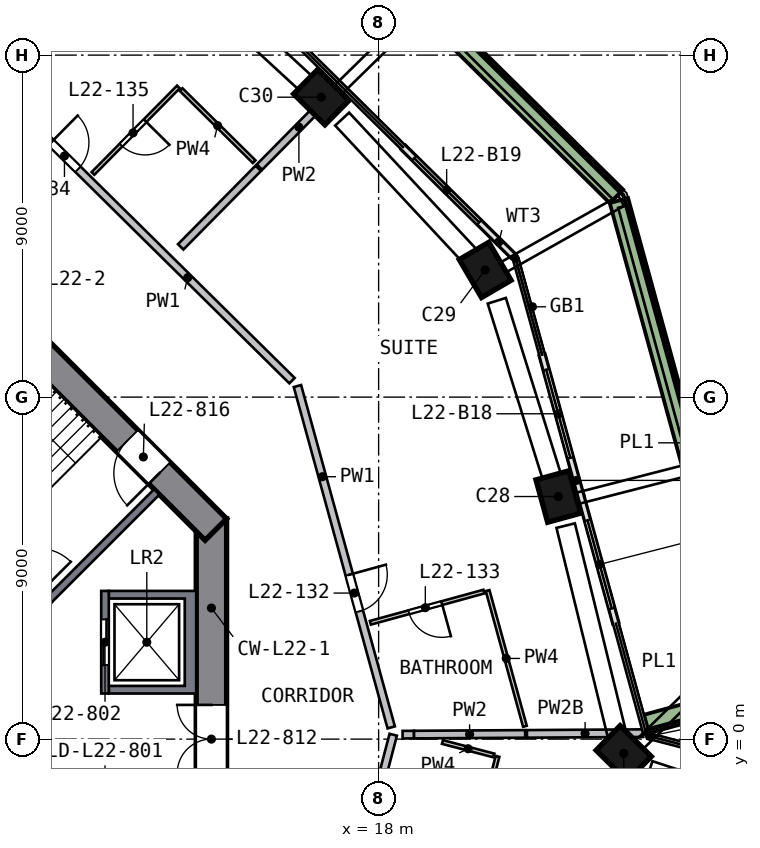
"""IFC4 building model, lengths in metres.
Left out: names, types, materials, properties, quantities, classifications, styles, units other than length and angle.
Written with IfcOpenShell. Run it as: python <this file> out.ifc"""

import sys

from ifc_helpers import new_model, si_unit, direction, frame, frame_2d, origin, origin_2d, place, context, subcontext, project, spatial, polyline, rectangle, outline, extrude, element, fill, save


model = new_model("IFC4")
c1 = context("Model", 3, precision=1e-05, world=origin(), true_north=direction((0.0, 1.0)))
c2 = subcontext(c1, "Body", "Model", "MODEL_VIEW")
j1 = project(units=[si_unit("LENGTHUNIT", "METRE"), si_unit("PLANEANGLEUNIT", "RADIAN")], contexts=[c1])
p1 = place(None, origin())
s1 = spatial("IfcSite", under=j1, at=p1, CompositionType="ELEMENT")
p2 = place(p1, origin())
s2 = spatial("IfcBuilding", under=s1, at=p2, CompositionType="ELEMENT")
p3 = place(p2, frame((0.0, 0.0, 96.5)))
s3 = spatial("IfcBuildingStorey", under=s2, at=p3, CompositionType="ELEMENT", Elevation=96.5)
p4 = place(p3, frame((24.448, -0.516, 0.0), z_axis=(0.001444299, 0.116228048, 0.993221503), x_axis=(0.71418589, -0.69533129, 0.080330018)))
e1 = element("IfcColumn", 1, at=p4, inside=s3, PredefinedType="COLUMN", context=c2, shape_type="SweptSolid", body=[
    extrude(rectangle(XDim=1.15, YDim=0.9, at=origin_2d()), origin(), (0.0, 0.0, 1.0), 3.212),
])
p5 = place(p3, frame((22.765, 6.253, 0.0), z_axis=(-0.030724182, 0.108066988, 0.993668733), x_axis=(-0.263618015, 0.958062623, -0.112345681)))
e2 = element("IfcColumn", 2, at=p5, inside=s3, PredefinedType="COLUMN", context=c2, shape_type="SweptSolid", body=[
    extrude(rectangle(XDim=1.15, YDim=0.9, at=origin_2d()), origin(), (0.0, 0.0, 1.0), 3.21),
])
p6 = place(p3, frame((20.875, 12.228, 0.0), z_axis=(-0.058920732, 0.098758749, 0.99336552), x_axis=(0.501695659, -0.857366586, 0.114995663)))
e3 = element("IfcColumn", 3, at=p6, inside=s3, PredefinedType="COLUMN", context=c2, shape_type="SweptSolid", body=[
    extrude(rectangle(XDim=1.15, YDim=0.9, at=origin_2d()), origin(), (0.0, 0.0, 1.0), 3.211),
])
p7 = place(p3, frame((16.588, 16.798, 0.0), z_axis=(-0.080537401, 0.078255888, 0.993674868), x_axis=(-0.706754906, 0.698489901, -0.112291409)))
e4 = element("IfcColumn", 4, at=p7, inside=s3, PredefinedType="COLUMN", context=c2, shape_type="SweptSolid", body=[
    extrude(rectangle(XDim=1.15, YDim=0.9, at=origin_2d()), origin(), (0.0, 0.0, 1.0), 3.21),
])
p8 = place(p3, frame((13.6, -5.799, 0.0), z_axis=(0.0, 0.0, 1.0), x_axis=(0.0, 1.0, 0.0)))
e5 = element("IfcWall", 5, at=p8, inside=s3, PredefinedType="SHEAR", context=c2, shape_type="SweptSolid", body=[
    extrude(rectangle(XDim=11.598, YDim=0.8, at=frame_2d((5.799, 0.0))), origin(), (0.0, 0.0, 1.0), 3.5),
])
p9 = place(p8, frame((4.899, 0.0, 0.0)))
e6 = element("IfcOpeningElement", 6, at=p9, cuts=e5, PredefinedType="OPENING", context=c2, shape_type="SweptSolid", body=[
    extrude(rectangle(XDim=1.8, YDim=2.1, at=frame_2d((0.9, 1.05))), frame((0.0, 0.41, 0.0), z_axis=(0.0, -1.0, 0.0), x_axis=(1.0, 0.0, 0.0)), (0.0, 0.0, 1.0), 0.82),
])
p10 = place(p3, frame((13.717, 5.516, 0.0), z_axis=(0.0, 0.0, 1.0), x_axis=(-0.707106781, 0.707106781, 0.0)))
e7 = element("IfcWall", 7, at=p10, inside=s3, PredefinedType="SHEAR", context=c2, shape_type="SweptSolid", body=[
    extrude(rectangle(XDim=11.598, YDim=0.8, at=frame_2d((5.799, 0.0))), origin(), (0.0, 0.0, 1.0), 3.5),
])
p11 = place(p10, frame((2.099, 0.0, 0.0)))
e8 = element("IfcOpeningElement", 8, at=p11, cuts=e7, PredefinedType="OPENING", context=c2, shape_type="SweptSolid", body=[
    extrude(rectangle(XDim=1.2, YDim=2.1, at=frame_2d((0.6, 1.05))), frame((0.0, 0.41, 0.0), z_axis=(0.0, -1.0, 0.0), x_axis=(1.0, 0.0, 0.0)), (0.0, 0.0, 1.0), 0.82),
])
p12 = place(p3, frame((24.24, 3.055, 0.0), z_axis=(0.0, 0.0, 1.0), x_axis=(-0.264870706, 0.964283936, 0.0)))
e9 = element("IfcWall", 9, at=p12, inside=s3, PredefinedType="SOLIDWALL", context=c2, shape_type="SweptSolid", body=[
    extrude(rectangle(XDim=3.475, YDim=0.15, at=frame_2d((1.737, 0.0))), origin(), (0.0, 0.0, 1.0), 2.425),
])
p13 = place(p12, frame((0.4, 0.0, 0.0)))
e10 = element("IfcOpeningElement", 10, at=p13, cuts=e9, PredefinedType="OPENING", context=c2, shape_type="SweptSolid", body=[
    extrude(rectangle(XDim=2.4, YDim=2.4, at=frame_2d((1.2, 1.2))), frame((0.0, 0.085, 0.0), z_axis=(0.0, -1.0, 0.0), x_axis=(1.0, 0.0, 0.0)), (0.0, 0.0, 1.0), 0.17),
])
p14 = place(p3, frame((23.32, 6.406, 0.0), z_axis=(0.0, 0.0, 1.0), x_axis=(-0.264921246, 0.964270052, 0.0)))
e11 = element("IfcWall", 11, at=p14, inside=s3, PredefinedType="SOLIDWALL", context=c2, shape_type="SweptSolid", body=[
    extrude(rectangle(XDim=3.835, YDim=0.15, at=frame_2d((1.918, 0.0))), origin(), (0.0, 0.0, 1.0), 2.425),
])
p15 = place(p14, frame((1.035, 0.0, 0.0)))
e12 = element("IfcOpeningElement", 12, at=p15, cuts=e11, PredefinedType="OPENING", context=c2, shape_type="SweptSolid", body=[
    extrude(rectangle(XDim=2.4, YDim=2.4, at=frame_2d((1.2, 1.2))), frame((0.0, 0.085, 0.0), z_axis=(0.0, -1.0, 0.0), x_axis=(1.0, 0.0, 0.0)), (0.0, 0.0, 1.0), 0.17),
])
p16 = place(p3, frame((21.546, 12.71, 0.0), z_axis=(0.0, 0.0, 1.0), x_axis=(-0.711563926, 0.702621363, 0.0)))
e13 = element("IfcWall", 13, at=p16, inside=s3, PredefinedType="SOLIDWALL", context=c2, shape_type="SweptSolid", body=[
    extrude(rectangle(XDim=4.068, YDim=0.15, at=frame_2d((2.034, 0.0))), origin(), (0.0, 0.0, 1.0), 2.425),
])
p17 = place(p16, frame((1.268, 0.0, 0.0)))
e14 = element("IfcOpeningElement", 14, at=p17, cuts=e13, PredefinedType="OPENING", context=c2, shape_type="SweptSolid", body=[
    extrude(rectangle(XDim=2.4, YDim=2.4, at=frame_2d((1.2, 1.2))), frame((0.0, 0.085, 0.0), z_axis=(0.0, -1.0, 0.0), x_axis=(1.0, 0.0, 0.0)), (0.0, 0.0, 1.0), 0.17),
])
p18 = place(p3, frame((25.048, 0.399, 0.0), z_axis=(0.0, 0.0, 1.0), x_axis=(0.964276089, 0.264899272, 0.0)))
e15 = element("IfcWall", 15, at=p18, inside=s3, PredefinedType="SOLIDWALL", context=c2, shape_type="SweptSolid", body=[
    extrude(rectangle(XDim=3.199, YDim=0.5, at=frame_2d((1.6, 0.0))), origin(), (0.0, 0.0, 1.0), 0.7),
])
p19 = place(p3, frame((27.826, 1.421, 0.0), z_axis=(0.0, 0.0, 1.0), x_axis=(-0.264886985, 0.964279464, 0.0)))
e16 = element("IfcWall", 16, at=p19, inside=s3, PredefinedType="SOLIDWALL", context=c2, shape_type="SweptSolid", body=[
    extrude(rectangle(XDim=13.223, YDim=0.5, at=frame_2d((6.612, 0.0))), origin(), (0.0, 0.0, 1.0), 0.7),
])
p20 = place(p3, frame((24.258, 14.284, 0.0), z_axis=(0.0, 0.0, 1.0), x_axis=(-0.711531471, 0.702654229, 0.0)))
e17 = element("IfcWall", 17, at=p20, inside=s3, PredefinedType="SOLIDWALL", context=c2, shape_type="SweptSolid", body=[
    extrude(rectangle(XDim=13.723, YDim=0.5, at=frame_2d((6.862, 0.0))), origin(), (0.0, 0.0, 1.0), 0.7),
])
p21 = place(p3, frame((27.95, -0.738, 0.0), z_axis=(0.0, 0.0, 1.0), x_axis=(-0.252753687, -0.967530658, 0.0)))
e18 = element("IfcWall", 18, at=p21, inside=s3, PredefinedType="SOLIDWALL", context=c2, shape_type="SweptSolid", body=[
    extrude(rectangle(XDim=12.7, YDim=0.2, at=frame_2d((6.35, 0.0))), origin(), (0.0, 0.0, 1.0), 3.19),
])
p22 = place(p21, frame((5.45, 0.0, 0.0)))
e19 = element("IfcOpeningElement", 19, at=p22, cuts=e18, PredefinedType="OPENING", context=c2, shape_type="SweptSolid", body=[
    extrude(rectangle(XDim=1.8, YDim=2.4, at=frame_2d((0.9, 1.2))), frame((0.0, 0.11, 0.0), z_axis=(0.0, -1.0, 0.0), x_axis=(1.0, 0.0, 0.0)), (0.0, 0.0, 1.0), 0.22),
])
p23 = place(p3, origin())
e20 = element("IfcWall", 20, at=p23, inside=s3, PredefinedType="SOLIDWALL", context=c2, shape_type="SweptSolid", body=[
    extrude(outline(polyline([(13.2, 3.9), (13.2, 1.2), (10.9, 1.2), (10.9, 1.4), (12.9, 1.4), (12.9, 3.7), (10.9, 3.7), (10.9, 3.9), (13.2, 3.9)])), origin(), (0.0, 0.0, 1.0), 3.19),
])
p24 = place(p3, frame((10.8, 1.2, 0.0), z_axis=(0.0, 0.0, 1.0), x_axis=(0.0, 1.0, 0.0)))
e21 = element("IfcWall", 21, at=p24, inside=s3, PredefinedType="SOLIDWALL", context=c2, shape_type="SweptSolid", body=[
    extrude(rectangle(XDim=2.7, YDim=0.2, at=frame_2d((1.35, 0.0))), origin(), (0.0, 0.0, 1.0), 3.19),
])
p25 = place(p24, frame((0.75, 0.0, 0.0)))
e22 = element("IfcOpeningElement", 22, at=p25, cuts=e21, PredefinedType="OPENING", context=c2, shape_type="SweptSolid", body=[
    extrude(rectangle(XDim=1.2, YDim=2.1, at=frame_2d((0.6, 1.05))), frame((0.0, 0.11, 0.0), z_axis=(0.0, -1.0, 0.0), x_axis=(1.0, 0.0, 0.0)), (0.0, 0.0, 1.0), 0.22),
])
p26 = place(p3, frame((9.334, 3.677, 0.0), z_axis=(0.0, 0.0, 1.0), x_axis=(0.707106781, 0.707106781, 0.0)))
e23 = element("IfcWall", 23, at=p26, inside=s3, PredefinedType="SOLIDWALL", context=c2, shape_type="SweptSolid", body=[
    extrude(rectangle(XDim=4.0, YDim=0.2, at=frame_2d((2.0, 0.0))), origin(), (0.0, 0.0, 1.0), 3.19),
])
p27 = place(p3, frame((9.235, 15.838, 0.0), z_axis=(0.0, 0.0, 1.0), x_axis=(0.71153875, -0.702646859, 0.0)))
e24 = element("IfcWall", 24, at=p27, inside=s3, PredefinedType="SOLIDWALL", context=c2, shape_type="SweptSolid", body=[
    extrude(rectangle(XDim=9.115, YDim=0.2, at=frame_2d((4.558, 0.0))), origin(), (0.0, 0.0, 1.0), 3.19),
])
p28 = place(p27, frame((0.2, 0.0, 0.0)))
e25 = element("IfcOpeningElement", 25, at=p28, cuts=e24, PredefinedType="OPENING", context=c2, shape_type="SweptSolid", body=[
    extrude(rectangle(XDim=1.0, YDim=2.1, at=frame_2d((0.5, 1.05))), frame((0.0, 0.11, 0.0), z_axis=(0.0, -1.0, 0.0), x_axis=(1.0, 0.0, 0.0)), (0.0, 0.0, 1.0), 0.22),
])
p29 = place(p3, frame((15.864, 9.292, 0.0), z_axis=(0.0, 0.0, 1.0), x_axis=(0.264866543, -0.96428508, 0.0)))
e26 = element("IfcWall", 26, at=p29, inside=s3, PredefinedType="SOLIDWALL", context=c2, shape_type="SweptSolid", body=[
    extrude(rectangle(XDim=9.316, YDim=0.2, at=frame_2d((4.658, 0.0))), origin(), (0.0, 0.0, 1.0), 3.19),
])
p30 = place(p29, frame((5.15, 0.0, 0.0)))
e27 = element("IfcOpeningElement", 27, at=p30, cuts=e26, PredefinedType="OPENING", context=c2, shape_type="SweptSolid", body=[
    extrude(rectangle(XDim=1.0, YDim=2.1, at=frame_2d((0.5, 1.05))), frame((0.0, 0.11, 0.0), z_axis=(0.0, -1.0, 0.0), x_axis=(1.0, 0.0, 0.0)), (0.0, 0.0, 1.0), 0.22),
])
p31 = place(p3, frame((17.46, -3.424, 0.0), z_axis=(0.0, 0.0, 1.0), x_axis=(0.252791341, 0.96752082, 0.0)))
e28 = element("IfcWall", 28, at=p31, inside=s3, PredefinedType="SOLIDWALL", context=c2, shape_type="SweptSolid", body=[
    extrude(rectangle(XDim=3.658, YDim=0.2, at=frame_2d((1.829, 0.0))), origin(), (0.0, 0.0, 1.0), 3.19),
])
p32 = place(p3, frame((12.792, 12.954, 0.0), z_axis=(0.0, 0.0, 1.0), x_axis=(0.702638225, 0.711547275, 0.0)))
e29 = element("IfcWall", 29, at=p32, inside=s3, PredefinedType="SOLIDWALL", context=c2, shape_type="SweptSolid", body=[
    extrude(rectangle(XDim=2.905, YDim=0.2, at=frame_2d((1.452, 0.0))), origin(), (0.0, 0.0, 1.0), 3.19),
])
p33 = place(p3, frame((14.865, 15.053, 0.0), z_axis=(0.0, 0.0, 1.0), x_axis=(0.702668179, 0.711517695, 0.0)))
e30 = element("IfcWall", 30, at=p33, inside=s3, PredefinedType="SOLIDWALL", context=c2, shape_type="SweptSolid", body=[
    extrude(rectangle(XDim=2.952, YDim=0.2, at=frame_2d((1.476, 0.0))), origin(), (0.0, 0.0, 1.0), 3.19),
])
p34 = place(p3, frame((18.631, 0.117, 0.0), z_axis=(0.0, 0.0, 1.0), x_axis=(0.999983911, 0.005672518, 0.0)))
e31 = element("IfcWall", 31, at=p34, inside=s3, PredefinedType="SOLIDWALL", context=c2, shape_type="SweptSolid", body=[
    extrude(rectangle(XDim=0.301, YDim=0.2, at=frame_2d((0.151, 0.0))), origin(), (0.0, 0.0, 1.0), 3.19),
])
p35 = place(p3, frame((18.932, 0.119, 0.0), z_axis=(0.0, 0.0, 1.0), x_axis=(0.999980398, 0.006261357, 0.0)))
e32 = element("IfcWall", 32, at=p35, inside=s3, PredefinedType="SOLIDWALL", context=c2, shape_type="SweptSolid", body=[
    extrude(rectangle(XDim=2.924, YDim=0.2, at=frame_2d((1.462, 0.0))), origin(), (0.0, 0.0, 1.0), 3.19),
])
p36 = place(p3, frame((21.902, 0.138, 0.0), z_axis=(0.0, 0.0, 1.0), x_axis=(0.999980157, 0.006299715, 0.0)))
e33 = element("IfcWall", 33, at=p36, inside=s3, PredefinedType="SOLIDWALL", context=c2, shape_type="SweptSolid", body=[
    extrude(rectangle(XDim=3.062, YDim=0.2, at=frame_2d((1.531, 0.0))), origin(), (0.0, 0.0, 1.0), 2.69),
])
p37 = place(p3, frame((12.732, 17.163, 0.0), z_axis=(0.0, 0.0, 1.0), x_axis=(-0.702667882, -0.711517988, 0.0)))
e34 = element("IfcWall", 34, at=p37, inside=s3, PredefinedType="PARTITIONING", context=c2, shape_type="SweptSolid", body=[
    extrude(rectangle(XDim=3.2, YDim=0.1, at=frame_2d((1.6, 0.0))), origin(), (0.0, 0.0, 1.0), 3.19),
])
p38 = place(p37, frame((1.25, 0.0, 0.0)))
e35 = element("IfcOpeningElement", 35, at=p38, cuts=e34, PredefinedType="OPENING", context=c2, shape_type="SweptSolid", body=[
    extrude(rectangle(XDim=0.9, YDim=2.1, at=frame_2d((0.45, 1.05))), frame((0.0, 0.06, 0.0), z_axis=(0.0, -1.0, 0.0), x_axis=(1.0, 0.0, 0.0)), (0.0, 0.0, 1.0), 0.12),
])
p39 = place(p3, frame((12.803, 17.093, 0.0), z_axis=(0.0, 0.0, 1.0), x_axis=(0.711523533, -0.702662267, 0.0)))
e36 = element("IfcWall", 36, at=p39, inside=s3, PredefinedType="PARTITIONING", context=c2, shape_type="SweptSolid", body=[
    extrude(rectangle(XDim=2.7, YDim=0.1, at=frame_2d((1.35, 0.0))), origin(), (0.0, 0.0, 1.0), 3.19),
])
p40 = place(p3, frame((20.772, 3.883, 0.0), z_axis=(0.0, 0.0, 1.0), x_axis=(-0.964267784, -0.264929502, 0.0)))
e37 = element("IfcWall", 37, at=p40, inside=s3, PredefinedType="PARTITIONING", context=c2, shape_type="SweptSolid", body=[
    extrude(rectangle(XDim=3.1, YDim=0.1, at=frame_2d((1.55, 0.0))), origin(), (0.0, 0.0, 1.0), 3.19),
])
p41 = place(p40, frame((1.15, 0.0, 0.0)))
e38 = element("IfcOpeningElement", 38, at=p41, cuts=e37, PredefinedType="OPENING", context=c2, shape_type="SweptSolid", body=[
    extrude(rectangle(XDim=0.9, YDim=2.1, at=frame_2d((0.45, 1.05))), frame((0.0, 0.06, 0.0), z_axis=(0.0, -1.0, 0.0), x_axis=(1.0, 0.0, 0.0)), (0.0, 0.0, 1.0), 0.12),
])
p42 = place(p3, frame((19.679, -0.076, 0.0), z_axis=(0.0, 0.0, 1.0), x_axis=(0.967574623, -0.252585329, 0.0)))
e39 = element("IfcWall", 39, at=p42, inside=s3, PredefinedType="PARTITIONING", context=c2, shape_type="SweptSolid", body=[
    extrude(rectangle(XDim=1.399, YDim=0.1, at=frame_2d((0.699, 0.0))), origin(), (0.0, 0.0, 1.0), 3.19),
])
p43 = place(p3, frame((20.219, -3.938, 0.0), z_axis=(0.0, 0.0, 1.0), x_axis=(0.2527504, 0.967531516, 0.0)))
e40 = element("IfcWall", 40, at=p43, inside=s3, PredefinedType="PARTITIONING", context=c2, shape_type="SweptSolid", body=[
    extrude(rectangle(XDim=3.6, YDim=0.1, at=frame_2d((1.8, 0.0))), origin(), (0.0, 0.0, 1.0), 3.19),
])
p44 = place(p43, frame((1.2, 0.0, 0.0)))
e41 = element("IfcOpeningElement", 41, at=p44, cuts=e40, PredefinedType="OPENING", context=c2, shape_type="SweptSolid", body=[
    extrude(rectangle(XDim=1.0, YDim=2.1, at=frame_2d((0.5, 1.05))), frame((0.0, 0.06, 0.0), z_axis=(0.0, -1.0, 0.0), x_axis=(1.0, 0.0, 0.0)), (0.0, 0.0, 1.0), 0.12),
])
p45 = place(p3, frame((20.868, 3.909, 0.0), z_axis=(0.0, 0.0, 1.0), x_axis=(0.264851593, -0.964289186, 0.0)))
e42 = element("IfcWall", 42, at=p45, inside=s3, PredefinedType="PARTITIONING", context=c2, shape_type="SweptSolid", body=[
    extrude(rectangle(XDim=3.704, YDim=0.1, at=frame_2d((1.852, 0.0))), origin(), (0.0, 0.0, 1.0), 3.19),
])
p46 = place(p13, origin())
e43 = element("IfcDoor", 43, at=p46, inside=s3, OperationType="SLIDING_TO_RIGHT", PredefinedType="DOOR", context=c2, shape_type="SweptSolid", body=[
    extrude(rectangle(XDim=2.4, YDim=2.4, at=frame_2d((1.2, 1.2))), frame((0.0, 0.025, 0.0), z_axis=(0.0, -1.0, 0.0), x_axis=(1.0, 0.0, 0.0)), (0.0, 0.0, 1.0), 0.05),
])
fill(e10, e43)
p47 = place(p15, origin())
e44 = element("IfcDoor", 44, at=p47, inside=s3, OperationType="SLIDING_TO_LEFT", PredefinedType="DOOR", context=c2, shape_type="SweptSolid", body=[
    extrude(rectangle(XDim=2.4, YDim=2.4, at=frame_2d((1.2, 1.2))), frame((0.0, 0.025, 0.0), z_axis=(0.0, -1.0, 0.0), x_axis=(1.0, 0.0, 0.0)), (0.0, 0.0, 1.0), 0.05),
])
fill(e12, e44)
p48 = place(p17, origin())
e45 = element("IfcDoor", 45, at=p48, inside=s3, OperationType="SLIDING_TO_LEFT", PredefinedType="DOOR", context=c2, shape_type="SweptSolid", body=[
    extrude(rectangle(XDim=2.4, YDim=2.4, at=frame_2d((1.2, 1.2))), frame((0.0, 0.025, 0.0), z_axis=(0.0, -1.0, 0.0), x_axis=(1.0, 0.0, 0.0)), (0.0, 0.0, 1.0), 0.05),
])
fill(e14, e45)
p49 = place(p25, origin())
e46 = element("IfcDoor", 46, at=p49, inside=s3, OperationType="DOUBLE_DOOR_SLIDING", PredefinedType="DOOR", context=c2, shape_type="SweptSolid", body=[
    extrude(rectangle(XDim=1.2, YDim=2.1, at=frame_2d((0.6, 1.05))), frame((0.0, 0.025, 0.0), z_axis=(0.0, -1.0, 0.0), x_axis=(1.0, 0.0, 0.0)), (0.0, 0.0, 1.0), 0.05),
])
fill(e22, e46)
p50 = place(p9, origin())
e47 = element("IfcDoor", 47, at=p50, inside=s3, OperationType="DOUBLE_DOOR_SINGLE_SWING", PredefinedType="DOOR", context=c2, shape_type="SweptSolid", body=[
    extrude(rectangle(XDim=1.8, YDim=2.1, at=frame_2d((0.9, 1.05))), frame((0.0, 0.025, 0.0), z_axis=(0.0, -1.0, 0.0), x_axis=(1.0, 0.0, 0.0)), (0.0, 0.0, 1.0), 0.05),
])
fill(e6, e47)
p51 = place(p11, origin())
e48 = element("IfcDoor", 48, at=p51, inside=s3, OperationType="SINGLE_SWING_LEFT", PredefinedType="DOOR", context=c2, shape_type="SweptSolid", body=[
    extrude(rectangle(XDim=1.2, YDim=2.1, at=frame_2d((0.6, 1.05))), frame((0.0, 0.025, 0.0), z_axis=(0.0, -1.0, 0.0), x_axis=(1.0, 0.0, 0.0)), (0.0, 0.0, 1.0), 0.05),
])
fill(e8, e48)
p52 = place(p30, origin())
e49 = element("IfcDoor", 49, at=p52, inside=s3, OperationType="SINGLE_SWING_LEFT", PredefinedType="DOOR", context=c2, shape_type="SweptSolid", body=[
    extrude(rectangle(XDim=1.0, YDim=2.1, at=frame_2d((0.5, 1.05))), frame((0.0, 0.025, 0.0), z_axis=(0.0, -1.0, 0.0), x_axis=(1.0, 0.0, 0.0)), (0.0, 0.0, 1.0), 0.05),
])
fill(e27, e49)
p53 = place(p41, origin())
e50 = element("IfcDoor", 50, at=p53, inside=s3, OperationType="SINGLE_SWING_LEFT", PredefinedType="DOOR", context=c2, shape_type="SweptSolid", body=[
    extrude(rectangle(XDim=0.9, YDim=2.1, at=frame_2d((0.45, 1.05))), frame((0.0, 0.025, 0.0), z_axis=(0.0, -1.0, 0.0), x_axis=(1.0, 0.0, 0.0)), (0.0, 0.0, 1.0), 0.05),
])
fill(e38, e50)
p54 = place(p28, origin())
e51 = element("IfcDoor", 51, at=p54, inside=s3, OperationType="SINGLE_SWING_LEFT", PredefinedType="DOOR", context=c2, shape_type="SweptSolid", body=[
    extrude(rectangle(XDim=1.0, YDim=2.1, at=frame_2d((0.5, 1.05))), frame((0.0, 0.025, 0.0), z_axis=(0.0, -1.0, 0.0), x_axis=(1.0, 0.0, 0.0)), (0.0, 0.0, 1.0), 0.05),
])
fill(e25, e51)
p55 = place(p38, origin())
e52 = element("IfcDoor", 52, at=p55, inside=s3, OperationType="SINGLE_SWING_LEFT", PredefinedType="DOOR", context=c2, shape_type="SweptSolid", body=[
    extrude(rectangle(XDim=0.9, YDim=2.1, at=frame_2d((0.45, 1.05))), frame((0.0, 0.025, 0.0), z_axis=(0.0, -1.0, 0.0), x_axis=(1.0, 0.0, 0.0)), (0.0, 0.0, 1.0), 0.05),
])
fill(e35, e52)
save(model, sys.argv[1])
